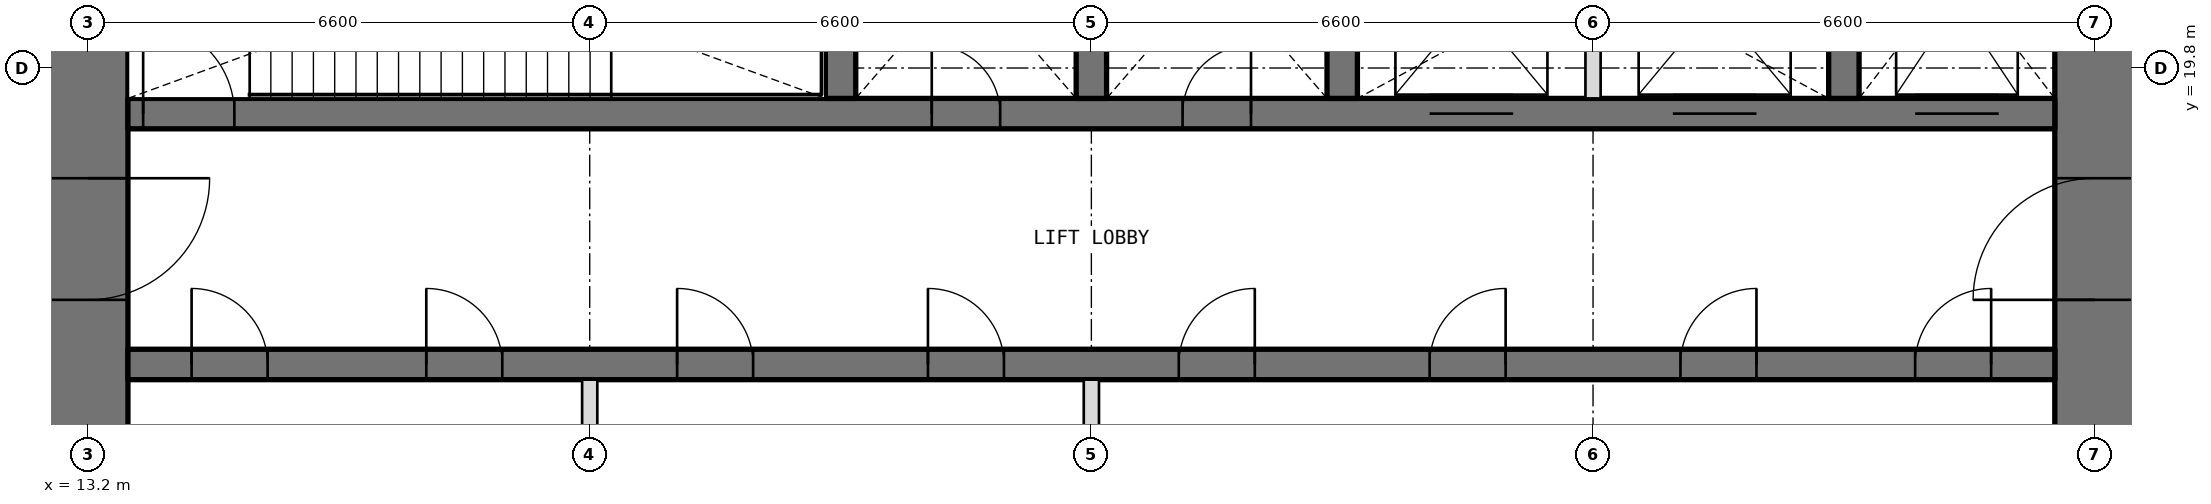
"""IFC4 building model, lengths in metres.
Left out: names, types, materials, properties, quantities, classifications, styles, units other than length and angle.
Written with IfcOpenShell. Run it as: python <this file> out.ifc"""

import sys

from ifc_helpers import new_model, si_unit, direction, frame, frame_2d, origin, place, context, subcontext, project, spatial, rectangle, extrude, element, fill, save


model = new_model("IFC4")
c1 = context("Model", 3, precision=1e-05, world=origin(), true_north=direction((0.0, 1.0)))
c2 = subcontext(c1, "Body", "Model", "MODEL_VIEW")
j1 = project(units=[si_unit("LENGTHUNIT", "METRE"), si_unit("PLANEANGLEUNIT", "RADIAN")], contexts=[c1])
p1 = place(None, origin())
s1 = spatial("IfcSite", under=j1, at=p1, CompositionType="ELEMENT")
p2 = place(p1, origin())
s2 = spatial("IfcBuilding", under=s1, at=p2, CompositionType="ELEMENT")
p3 = place(p2, frame((0.0, 0.0, 222.9)))
s3 = spatial("IfcBuildingStorey", under=s2, at=p3, CompositionType="ELEMENT", Elevation=222.9)
p4 = place(p3, frame((39.6, 13.725, 0.0), z_axis=(0.0, 0.0, 1.0), x_axis=(0.0, 1.0, 0.0)))
e1 = element("IfcWall", 1, at=p4, inside=s3, PredefinedType="SHEAR", context=c2, shape_type="SweptSolid", body=[
    extrude(rectangle(XDim=18.75, YDim=1.05, at=frame_2d((9.375, 0.0))), origin(), (0.0, 0.0, 1.0), 6.3),
])
p5 = place(p4, frame((3.025, 0.0, 0.0)))
e2 = element("IfcOpeningElement", 2, at=p5, cuts=e1, PredefinedType="OPENING", context=c2, shape_type="SweptSolid", body=[
    extrude(rectangle(XDim=1.6, YDim=2.1, at=frame_2d((0.8, 1.05))), frame((0.0, 0.535, 0.0), z_axis=(0.0, -1.0, 0.0), x_axis=(1.0, 0.0, 0.0)), (0.0, 0.0, 1.0), 1.07),
])
p6 = place(p4, frame((13.825, 0.0, 0.0)))
e3 = element("IfcOpeningElement", 3, at=p6, cuts=e1, PredefinedType="OPENING", context=c2, shape_type="SweptSolid", body=[
    extrude(rectangle(XDim=1.6, YDim=2.1, at=frame_2d((0.8, 1.05))), frame((0.0, 0.535, 0.0), z_axis=(0.0, -1.0, 0.0), x_axis=(1.0, 0.0, 0.0)), (0.0, 0.0, 1.0), 1.07),
])
p7 = place(p3, frame((13.2, 32.475, 0.0), z_axis=(0.0, 0.0, 1.0), x_axis=(0.0, -1.0, 0.0)))
e4 = element("IfcWall", 4, at=p7, inside=s3, PredefinedType="SHEAR", context=c2, shape_type="SweptSolid", body=[
    extrude(rectangle(XDim=18.75, YDim=1.05, at=frame_2d((9.375, 0.0))), origin(), (0.0, 0.0, 1.0), 6.3),
])
p8 = place(p7, frame((14.125, 0.0, 0.0)))
e5 = element("IfcOpeningElement", 5, at=p8, cuts=e4, PredefinedType="OPENING", context=c2, shape_type="SweptSolid", body=[
    extrude(rectangle(XDim=1.6, YDim=2.1, at=frame_2d((0.8, 1.05))), frame((0.0, 0.535, 0.0), z_axis=(0.0, -1.0, 0.0), x_axis=(1.0, 0.0, 0.0)), (0.0, 0.0, 1.0), 1.07),
])
p9 = place(p7, frame((3.325, 0.0, 0.0)))
e6 = element("IfcOpeningElement", 6, at=p9, cuts=e4, PredefinedType="OPENING", context=c2, shape_type="SweptSolid", body=[
    extrude(rectangle(XDim=1.6, YDim=2.1, at=frame_2d((0.8, 1.05))), frame((0.0, 0.535, 0.0), z_axis=(0.0, -1.0, 0.0), x_axis=(1.0, 0.0, 0.0)), (0.0, 0.0, 1.0), 1.07),
])
p10 = place(p3, frame((13.725, 15.9, 0.0), z_axis=(0.0, 0.0, 1.0), x_axis=(1.0, 0.0, 0.0)))
e7 = element("IfcWall", 7, at=p10, inside=s3, PredefinedType="SHEAR", context=c2, shape_type="SweptSolid", body=[
    extrude(rectangle(XDim=25.35, YDim=0.4, at=frame_2d((12.675, 0.0))), origin(), (0.0, 0.0, 1.0), 6.3),
])
p11 = place(p10, frame((0.837, 0.0, 0.0)))
e8 = element("IfcOpeningElement", 8, at=p11, cuts=e7, PredefinedType="OPENING", context=c2, shape_type="SweptSolid", body=[
    extrude(rectangle(XDim=1.0, YDim=2.1, at=frame_2d((0.5, 1.05))), frame((0.0, 0.21, 0.0), z_axis=(0.0, -1.0, 0.0), x_axis=(1.0, 0.0, 0.0)), (0.0, 0.0, 1.0), 0.42),
])
p12 = place(p10, frame((3.925, 0.0, 0.0)))
e9 = element("IfcOpeningElement", 9, at=p12, cuts=e7, PredefinedType="OPENING", context=c2, shape_type="SweptSolid", body=[
    extrude(rectangle(XDim=1.0, YDim=2.1, at=frame_2d((0.5, 1.05))), frame((0.0, 0.21, 0.0), z_axis=(0.0, -1.0, 0.0), x_axis=(1.0, 0.0, 0.0)), (0.0, 0.0, 1.0), 0.42),
])
p13 = place(p10, frame((7.225, 0.0, 0.0)))
e10 = element("IfcOpeningElement", 10, at=p13, cuts=e7, PredefinedType="OPENING", context=c2, shape_type="SweptSolid", body=[
    extrude(rectangle(XDim=1.0, YDim=2.1, at=frame_2d((0.5, 1.05))), frame((0.0, 0.21, 0.0), z_axis=(0.0, -1.0, 0.0), x_axis=(1.0, 0.0, 0.0)), (0.0, 0.0, 1.0), 0.42),
])
p14 = place(p10, frame((10.525, 0.0, 0.0)))
e11 = element("IfcOpeningElement", 11, at=p14, cuts=e7, PredefinedType="OPENING", context=c2, shape_type="SweptSolid", body=[
    extrude(rectangle(XDim=1.0, YDim=2.1, at=frame_2d((0.5, 1.05))), frame((0.0, 0.21, 0.0), z_axis=(0.0, -1.0, 0.0), x_axis=(1.0, 0.0, 0.0)), (0.0, 0.0, 1.0), 0.42),
])
p15 = place(p10, frame((13.825, 0.0, 0.0)))
e12 = element("IfcOpeningElement", 12, at=p15, cuts=e7, PredefinedType="OPENING", context=c2, shape_type="SweptSolid", body=[
    extrude(rectangle(XDim=1.0, YDim=2.1, at=frame_2d((0.5, 1.05))), frame((0.0, 0.21, 0.0), z_axis=(0.0, -1.0, 0.0), x_axis=(1.0, 0.0, 0.0)), (0.0, 0.0, 1.0), 0.42),
])
p16 = place(p10, frame((17.125, 0.0, 0.0)))
e13 = element("IfcOpeningElement", 13, at=p16, cuts=e7, PredefinedType="OPENING", context=c2, shape_type="SweptSolid", body=[
    extrude(rectangle(XDim=1.0, YDim=2.1, at=frame_2d((0.5, 1.05))), frame((0.0, 0.21, 0.0), z_axis=(0.0, -1.0, 0.0), x_axis=(1.0, 0.0, 0.0)), (0.0, 0.0, 1.0), 0.42),
])
p17 = place(p10, frame((20.425, 0.0, 0.0)))
e14 = element("IfcOpeningElement", 14, at=p17, cuts=e7, PredefinedType="OPENING", context=c2, shape_type="SweptSolid", body=[
    extrude(rectangle(XDim=1.0, YDim=2.1, at=frame_2d((0.5, 1.05))), frame((0.0, 0.21, 0.0), z_axis=(0.0, -1.0, 0.0), x_axis=(1.0, 0.0, 0.0)), (0.0, 0.0, 1.0), 0.42),
])
p18 = place(p10, frame((23.512, 0.0, 0.0)))
e15 = element("IfcOpeningElement", 15, at=p18, cuts=e7, PredefinedType="OPENING", context=c2, shape_type="SweptSolid", body=[
    extrude(rectangle(XDim=1.0, YDim=2.1, at=frame_2d((0.5, 1.05))), frame((0.0, 0.21, 0.0), z_axis=(0.0, -1.0, 0.0), x_axis=(1.0, 0.0, 0.0)), (0.0, 0.0, 1.0), 0.42),
])
p19 = place(p3, frame((13.725, 19.2, 0.0), z_axis=(0.0, 0.0, 1.0), x_axis=(1.0, 0.0, 0.0)))
e16 = element("IfcWall", 16, at=p19, inside=s3, PredefinedType="SHEAR", context=c2, shape_type="SweptSolid", body=[
    extrude(rectangle(XDim=25.35, YDim=0.4, at=frame_2d((12.675, 0.0))), origin(), (0.0, 0.0, 1.0), 6.3),
])
p20 = place(p19, frame((10.575, 0.0, 0.0)))
e17 = element("IfcOpeningElement", 17, at=p20, cuts=e16, PredefinedType="OPENING", context=c2, shape_type="SweptSolid", body=[
    extrude(rectangle(XDim=0.9, YDim=2.1, at=frame_2d((0.45, 1.05))), frame((0.0, 0.21, 0.0), z_axis=(0.0, -1.0, 0.0), x_axis=(1.0, 0.0, 0.0)), (0.0, 0.0, 1.0), 0.42),
])
p21 = place(p19, frame((13.875, 0.0, 0.0)))
e18 = element("IfcOpeningElement", 18, at=p21, cuts=e16, PredefinedType="OPENING", context=c2, shape_type="SweptSolid", body=[
    extrude(rectangle(XDim=0.9, YDim=2.1, at=frame_2d((0.45, 1.05))), frame((0.0, 0.21, 0.0), z_axis=(0.0, -1.0, 0.0), x_axis=(1.0, 0.0, 0.0)), (0.0, 0.0, 1.0), 0.42),
])
p22 = place(p19, frame((0.2, 0.0, 0.0)))
e19 = element("IfcOpeningElement", 19, at=p22, cuts=e16, PredefinedType="OPENING", context=c2, shape_type="SweptSolid", body=[
    extrude(rectangle(XDim=1.2, YDim=2.1, at=frame_2d((0.6, 1.05))), frame((0.0, 0.21, 0.0), z_axis=(0.0, -1.0, 0.0), x_axis=(1.0, 0.0, 0.0)), (0.0, 0.0, 1.0), 0.42),
])
p23 = place(p19, frame((23.512, 0.0, 0.0)))
e20 = element("IfcOpeningElement", 20, at=p23, cuts=e16, PredefinedType="OPENING", context=c2, shape_type="SweptSolid", body=[
    extrude(rectangle(XDim=1.1, YDim=2.1, at=frame_2d((0.55, 1.05))), frame((0.0, 0.21, 0.0), z_axis=(0.0, -1.0, 0.0), x_axis=(1.0, 0.0, 0.0)), (0.0, 0.0, 1.0), 0.42),
])
p24 = place(p19, frame((17.125, 0.0, 0.0)))
e21 = element("IfcOpeningElement", 21, at=p24, cuts=e16, PredefinedType="OPENING", context=c2, shape_type="SweptSolid", body=[
    extrude(rectangle(XDim=1.1, YDim=2.1, at=frame_2d((0.55, 1.05))), frame((0.0, 0.21, 0.0), z_axis=(0.0, -1.0, 0.0), x_axis=(1.0, 0.0, 0.0)), (0.0, 0.0, 1.0), 0.42),
])
p25 = place(p19, frame((20.325, 0.0, 0.0)))
e22 = element("IfcOpeningElement", 22, at=p25, cuts=e16, PredefinedType="OPENING", context=c2, shape_type="SweptSolid", body=[
    extrude(rectangle(XDim=1.1, YDim=2.1, at=frame_2d((0.55, 1.05))), frame((0.0, 0.21, 0.0), z_axis=(0.0, -1.0, 0.0), x_axis=(1.0, 0.0, 0.0)), (0.0, 0.0, 1.0), 0.42),
])
for number, where, z_axis, x_axis in (
    (23, (23.1, 19.4, 0.0), (0.0, 0.0, 1.0), (0.0, 1.0, 0.0)),
    (24, (26.4, 19.4, 0.0), (0.0, 0.0, 1.0), (0.0, 1.0, 0.0)),
    (25, (29.7, 19.4, 0.0), (0.0, 0.0, 1.0), (0.0, 1.0, 0.0)),
    (26, (36.3, 19.4, 0.0), (0.0, 0.0, 1.0), (0.0, 1.0, 0.0)),
):
    element("IfcWall", number, at=place(p3, frame(where, z_axis=z_axis, x_axis=x_axis)), inside=s3, PredefinedType="SHEAR", context=c2, shape_type="SweptSolid", body=[
        extrude(rectangle(XDim=3.35, YDim=0.4, at=frame_2d((1.675, 0.0))), origin(), (0.0, 0.0, 1.0), 6.3),
    ])
for number, where, z_axis, x_axis in (
    (27, (19.8, 13.725, 0.0), (0.0, 0.0, 1.0), (0.0, 1.0, 0.0)),
    (28, (26.4, 13.725, 0.0), (0.0, 0.0, 1.0), (0.0, 1.0, 0.0)),
):
    element("IfcWall", number, at=place(p3, frame(where, z_axis=z_axis, x_axis=x_axis)), inside=s3, PredefinedType="PARTITIONING", context=c2, shape_type="SweptSolid", body=[
        extrude(rectangle(XDim=1.975, YDim=0.2, at=frame_2d((0.987, 0.0))), origin(), (0.0, 0.0, 1.0), 6.3),
    ])
p26 = place(p3, frame((33.0, 19.4, 0.0), z_axis=(0.0, 0.0, 1.0), x_axis=(0.0, 1.0, 0.0)))
e29 = element("IfcWall", 29, at=p26, inside=s3, PredefinedType="PARTITIONING", context=c2, shape_type="SweptSolid", body=[
    extrude(rectangle(XDim=3.35, YDim=0.2, at=frame_2d((1.675, 0.0))), origin(), (0.0, 0.0, 1.0), 6.3),
])
p27 = place(p20, origin())
e30 = element("IfcDoor", 30, at=p27, inside=s3, OperationType="SINGLE_SWING_LEFT", PredefinedType="DOOR", context=c2, shape_type="SweptSolid", body=[
    extrude(rectangle(XDim=0.9, YDim=2.1, at=frame_2d((0.45, 1.05))), frame((0.0, 0.025, 0.0), z_axis=(0.0, -1.0, 0.0), x_axis=(1.0, 0.0, 0.0)), (0.0, 0.0, 1.0), 0.05),
])
fill(e17, e30)
p28 = place(p21, origin())
e31 = element("IfcDoor", 31, at=p28, inside=s3, OperationType="SINGLE_SWING_RIGHT", PredefinedType="DOOR", context=c2, shape_type="SweptSolid", body=[
    extrude(rectangle(XDim=0.9, YDim=2.1, at=frame_2d((0.45, 1.05))), frame((0.0, 0.025, 0.0), z_axis=(0.0, -1.0, 0.0), x_axis=(1.0, 0.0, 0.0)), (0.0, 0.0, 1.0), 0.05),
])
fill(e18, e31)
p29 = place(p11, origin())
e32 = element("IfcDoor", 32, at=p29, inside=s3, OperationType="SINGLE_SWING_LEFT", PredefinedType="DOOR", context=c2, shape_type="SweptSolid", body=[
    extrude(rectangle(XDim=1.0, YDim=2.1, at=frame_2d((0.5, 1.05))), frame((0.0, 0.025, 0.0), z_axis=(0.0, -1.0, 0.0), x_axis=(1.0, 0.0, 0.0)), (0.0, 0.0, 1.0), 0.05),
])
fill(e8, e32)
p30 = place(p12, origin())
e33 = element("IfcDoor", 33, at=p30, inside=s3, OperationType="SINGLE_SWING_LEFT", PredefinedType="DOOR", context=c2, shape_type="SweptSolid", body=[
    extrude(rectangle(XDim=1.0, YDim=2.1, at=frame_2d((0.5, 1.05))), frame((0.0, 0.025, 0.0), z_axis=(0.0, -1.0, 0.0), x_axis=(1.0, 0.0, 0.0)), (0.0, 0.0, 1.0), 0.05),
])
fill(e9, e33)
p31 = place(p13, origin())
e34 = element("IfcDoor", 34, at=p31, inside=s3, OperationType="SINGLE_SWING_LEFT", PredefinedType="DOOR", context=c2, shape_type="SweptSolid", body=[
    extrude(rectangle(XDim=1.0, YDim=2.1, at=frame_2d((0.5, 1.05))), frame((0.0, 0.025, 0.0), z_axis=(0.0, -1.0, 0.0), x_axis=(1.0, 0.0, 0.0)), (0.0, 0.0, 1.0), 0.05),
])
fill(e10, e34)
p32 = place(p14, origin())
e35 = element("IfcDoor", 35, at=p32, inside=s3, OperationType="SINGLE_SWING_LEFT", PredefinedType="DOOR", context=c2, shape_type="SweptSolid", body=[
    extrude(rectangle(XDim=1.0, YDim=2.1, at=frame_2d((0.5, 1.05))), frame((0.0, 0.025, 0.0), z_axis=(0.0, -1.0, 0.0), x_axis=(1.0, 0.0, 0.0)), (0.0, 0.0, 1.0), 0.05),
])
fill(e11, e35)
p33 = place(p15, origin())
e36 = element("IfcDoor", 36, at=p33, inside=s3, OperationType="SINGLE_SWING_RIGHT", PredefinedType="DOOR", context=c2, shape_type="SweptSolid", body=[
    extrude(rectangle(XDim=1.0, YDim=2.1, at=frame_2d((0.5, 1.05))), frame((0.0, 0.025, 0.0), z_axis=(0.0, -1.0, 0.0), x_axis=(1.0, 0.0, 0.0)), (0.0, 0.0, 1.0), 0.05),
])
fill(e12, e36)
p34 = place(p16, origin())
e37 = element("IfcDoor", 37, at=p34, inside=s3, OperationType="SINGLE_SWING_RIGHT", PredefinedType="DOOR", context=c2, shape_type="SweptSolid", body=[
    extrude(rectangle(XDim=1.0, YDim=2.1, at=frame_2d((0.5, 1.05))), frame((0.0, 0.025, 0.0), z_axis=(0.0, -1.0, 0.0), x_axis=(1.0, 0.0, 0.0)), (0.0, 0.0, 1.0), 0.05),
])
fill(e13, e37)
p35 = place(p17, origin())
e38 = element("IfcDoor", 38, at=p35, inside=s3, OperationType="SINGLE_SWING_RIGHT", PredefinedType="DOOR", context=c2, shape_type="SweptSolid", body=[
    extrude(rectangle(XDim=1.0, YDim=2.1, at=frame_2d((0.5, 1.05))), frame((0.0, 0.025, 0.0), z_axis=(0.0, -1.0, 0.0), x_axis=(1.0, 0.0, 0.0)), (0.0, 0.0, 1.0), 0.05),
])
fill(e14, e38)
p36 = place(p18, origin())
e39 = element("IfcDoor", 39, at=p36, inside=s3, OperationType="SINGLE_SWING_RIGHT", PredefinedType="DOOR", context=c2, shape_type="SweptSolid", body=[
    extrude(rectangle(XDim=1.0, YDim=2.1, at=frame_2d((0.5, 1.05))), frame((0.0, 0.025, 0.0), z_axis=(0.0, -1.0, 0.0), x_axis=(1.0, 0.0, 0.0)), (0.0, 0.0, 1.0), 0.05),
])
fill(e15, e39)
p37 = place(p22, origin())
e40 = element("IfcDoor", 40, at=p37, inside=s3, OperationType="SINGLE_SWING_LEFT", PredefinedType="DOOR", context=c2, shape_type="SweptSolid", body=[
    extrude(rectangle(XDim=1.2, YDim=2.1, at=frame_2d((0.6, 1.05))), frame((0.0, 0.025, 0.0), z_axis=(0.0, -1.0, 0.0), x_axis=(1.0, 0.0, 0.0)), (0.0, 0.0, 1.0), 0.05),
])
fill(e19, e40)
p38 = place(p8, origin())
e41 = element("IfcDoor", 41, at=p38, inside=s3, OperationType="DOUBLE_DOOR_DOUBLE_SWING", PredefinedType="DOOR", context=c2, shape_type="SweptSolid", body=[
    extrude(rectangle(XDim=1.6, YDim=2.1, at=frame_2d((0.8, 1.05))), frame((0.0, 0.025, 0.0), z_axis=(0.0, -1.0, 0.0), x_axis=(1.0, 0.0, 0.0)), (0.0, 0.0, 1.0), 0.05),
])
fill(e5, e41)
p39 = place(p5, origin())
e42 = element("IfcDoor", 42, at=p39, inside=s3, OperationType="DOUBLE_DOOR_DOUBLE_SWING", PredefinedType="DOOR", context=c2, shape_type="SweptSolid", body=[
    extrude(rectangle(XDim=1.6, YDim=2.1, at=frame_2d((0.8, 1.05))), frame((0.0, 0.025, 0.0), z_axis=(0.0, -1.0, 0.0), x_axis=(1.0, 0.0, 0.0)), (0.0, 0.0, 1.0), 0.05),
])
fill(e2, e42)
p40 = place(p23, origin())
e43 = element("IfcDoor", 43, at=p40, inside=s3, OperationType="DOUBLE_DOOR_SLIDING", PredefinedType="DOOR", context=c2, shape_type="SweptSolid", body=[
    extrude(rectangle(XDim=1.1, YDim=2.1, at=frame_2d((0.55, 1.05))), frame((0.0, 0.025, 0.0), z_axis=(0.0, -1.0, 0.0), x_axis=(1.0, 0.0, 0.0)), (0.0, 0.0, 1.0), 0.05),
])
fill(e20, e43)
p41 = place(p24, origin())
e44 = element("IfcDoor", 44, at=p41, inside=s3, OperationType="DOUBLE_DOOR_SLIDING", PredefinedType="DOOR", context=c2, shape_type="SweptSolid", body=[
    extrude(rectangle(XDim=1.1, YDim=2.1, at=frame_2d((0.55, 1.05))), frame((0.0, 0.025, 0.0), z_axis=(0.0, -1.0, 0.0), x_axis=(1.0, 0.0, 0.0)), (0.0, 0.0, 1.0), 0.05),
])
fill(e21, e44)
p42 = place(p25, origin())
e45 = element("IfcDoor", 45, at=p42, inside=s3, OperationType="DOUBLE_DOOR_SLIDING", PredefinedType="DOOR", context=c2, shape_type="SweptSolid", body=[
    extrude(rectangle(XDim=1.1, YDim=2.1, at=frame_2d((0.55, 1.05))), frame((0.0, 0.025, 0.0), z_axis=(0.0, -1.0, 0.0), x_axis=(1.0, 0.0, 0.0)), (0.0, 0.0, 1.0), 0.05),
])
fill(e22, e45)
save(model, sys.argv[1])
